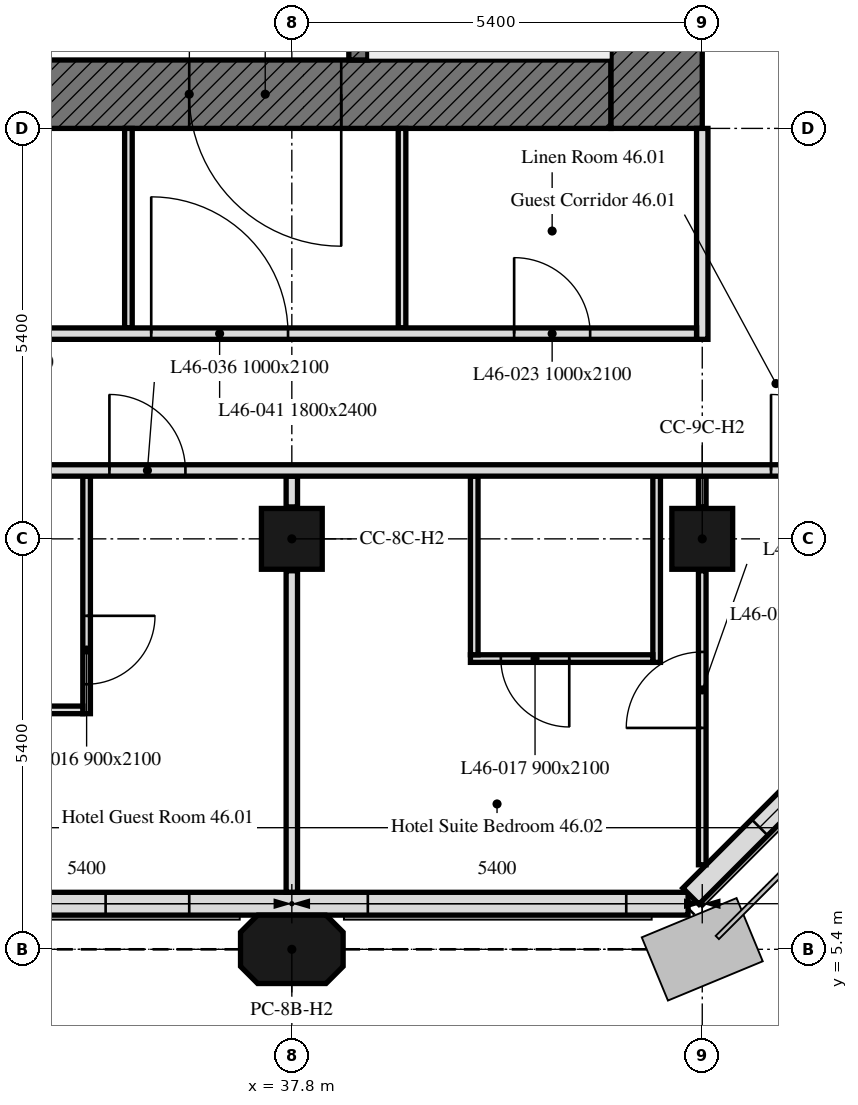
"""IFC4 building model, lengths in metres.
Left out: names, types, materials, properties, quantities, classifications, styles, units other than length and angle.
Written with IfcOpenShell. Run it as: python <this file> out.ifc"""

import sys

from ifc_helpers import new_model, si_unit, direction, frame, frame_2d, origin, origin_2d, place, context, subcontext, project, spatial, polyline, rectangle, outline, extrude, element, fill, save


model = new_model("IFC4")
c1 = context("Model", 3, precision=1e-05, world=origin(), true_north=direction((0.0, 1.0)))
c2 = subcontext(c1, "Body", "Model", "MODEL_VIEW")
j1 = project(units=[si_unit("LENGTHUNIT", "METRE"), si_unit("PLANEANGLEUNIT", "RADIAN")], contexts=[c1])
p1 = place(None, origin())
s1 = spatial("IfcSite", under=j1, at=p1, CompositionType="ELEMENT")
p2 = place(p1, origin())
s2 = spatial("IfcBuilding", under=s1, at=p2, CompositionType="ELEMENT")
p3 = place(p2, frame((0.0, 0.0, 190.6)))
s3 = spatial("IfcBuildingStorey", under=s2, at=p3, CompositionType="ELEMENT", Elevation=190.6)
p4 = place(p3, frame((37.8, 5.4, 0.0), z_axis=(0.0, 0.0, 1.0), x_axis=(1.0, 0.0, 0.0)))
e1 = element("IfcColumn", 1, at=p4, inside=s3, PredefinedType="COLUMN", context=c2, shape_type="SweptSolid", body=[
    extrude(outline(polyline([(-0.45, -0.45), (0.45, -0.45), (0.675, -0.225), (0.675, 0.225), (0.45, 0.45), (-0.45, 0.45), (-0.675, 0.225), (-0.675, -0.225), (-0.45, -0.45)])), origin(), (0.0, 0.0, 1.0), 3.0),
])
for number, where, z_axis, x_axis in (
    (2, (37.8, 10.8, 0.0), (0.0, 0.0, 1.0), (1.0, 0.0, 0.0)),
    (3, (43.2, 10.8, 0.0), (0.0, 0.0, 1.0), (1.0, 0.0, 0.0)),
):
    element("IfcColumn", number, at=place(p3, frame(where, z_axis=z_axis, x_axis=x_axis)), inside=s3, PredefinedType="COLUMN", context=c2, shape_type="SweptSolid", body=[
        extrude(rectangle(XDim=0.8, YDim=0.8, at=origin_2d()), origin(), (0.0, 0.0, 1.0), 3.0),
    ])
p5 = place(p3, frame((10.986, 6.0, 0.0), z_axis=(0.0, 0.0, 1.0), x_axis=(1.0, 0.0, 0.0)))
e4 = element("IfcWall", 4, at=p5, inside=s3, PredefinedType="SOLIDWALL", context=c2, shape_type="SweptSolid", body=[
    extrude(rectangle(XDim=32.027, YDim=0.3, at=frame_2d((16.014, 0.0))), origin(), (0.0, 0.0, 1.0), 3.0),
])
p6 = place(p5, frame((2.764, 0.0, 0.9)))
e5 = element("IfcOpeningElement", 5, at=p6, cuts=e4, PredefinedType="OPENING", context=c2, shape_type="SweptSolid", body=[
    extrude(rectangle(XDim=1.1, YDim=1.7, at=frame_2d((0.55, 0.85))), frame((0.0, 0.16, 0.0), z_axis=(0.0, -1.0, 0.0), x_axis=(1.0, 0.0, 0.0)), (0.0, 0.0, 1.0), 0.32),
])
p7 = place(p5, frame((6.214, 0.0, 0.9)))
e6 = element("IfcOpeningElement", 6, at=p7, cuts=e4, PredefinedType="OPENING", context=c2, shape_type="SweptSolid", body=[
    extrude(rectangle(XDim=3.4, YDim=1.7, at=frame_2d((1.7, 0.85))), frame((0.0, 0.16, 0.0), z_axis=(0.0, -1.0, 0.0), x_axis=(1.0, 0.0, 0.0)), (0.0, 0.0, 1.0), 0.32),
])
p8 = place(p5, frame((13.564, 0.0, 0.9)))
e7 = element("IfcOpeningElement", 7, at=p8, cuts=e4, PredefinedType="OPENING", context=c2, shape_type="SweptSolid", body=[
    extrude(rectangle(XDim=1.1, YDim=1.7, at=frame_2d((0.55, 0.85))), frame((0.0, 0.16, 0.0), z_axis=(0.0, -1.0, 0.0), x_axis=(1.0, 0.0, 0.0)), (0.0, 0.0, 1.0), 0.32),
])
p9 = place(p5, frame((17.014, 0.0, 0.9)))
e8 = element("IfcOpeningElement", 8, at=p9, cuts=e4, PredefinedType="OPENING", context=c2, shape_type="SweptSolid", body=[
    extrude(rectangle(XDim=3.4, YDim=1.7, at=frame_2d((1.7, 0.85))), frame((0.0, 0.16, 0.0), z_axis=(0.0, -1.0, 0.0), x_axis=(1.0, 0.0, 0.0)), (0.0, 0.0, 1.0), 0.32),
])
p10 = place(p5, frame((24.364, 0.0, 0.9)))
e9 = element("IfcOpeningElement", 9, at=p10, cuts=e4, PredefinedType="OPENING", context=c2, shape_type="SweptSolid", body=[
    extrude(rectangle(XDim=1.1, YDim=1.7, at=frame_2d((0.55, 0.85))), frame((0.0, 0.16, 0.0), z_axis=(0.0, -1.0, 0.0), x_axis=(1.0, 0.0, 0.0)), (0.0, 0.0, 1.0), 0.32),
])
p11 = place(p5, frame((27.814, 0.0, 0.9)))
e10 = element("IfcOpeningElement", 10, at=p11, cuts=e4, PredefinedType="OPENING", context=c2, shape_type="SweptSolid", body=[
    extrude(rectangle(XDim=3.4, YDim=1.7, at=frame_2d((1.7, 0.85))), frame((0.0, 0.16, 0.0), z_axis=(0.0, -1.0, 0.0), x_axis=(1.0, 0.0, 0.0)), (0.0, 0.0, 1.0), 0.32),
])
p12 = place(p3, frame((43.051, 6.099, 0.0), z_axis=(0.0, 0.0, 1.0), x_axis=(0.707106781187, 0.707106781187, 0.0)))
e11 = element("IfcWall", 11, at=p12, inside=s3, PredefinedType="SOLIDWALL", context=c2, shape_type="SweptSolid", body=[
    extrude(rectangle(XDim=6.86, YDim=0.3, at=frame_2d((3.43, 0.0))), origin(), (0.0, 0.0, 1.0), 3.0),
])
p13 = place(p12, frame((1.28, 0.0, 0.9)))
e12 = element("IfcOpeningElement", 12, at=p13, cuts=e11, PredefinedType="OPENING", context=c2, shape_type="SweptSolid", body=[
    extrude(rectangle(XDim=1.1, YDim=1.7, at=frame_2d((0.55, 0.85))), frame((0.0, 0.16, 0.0), z_axis=(0.0, -1.0, 0.0), x_axis=(1.0, 0.0, 0.0)), (0.0, 0.0, 1.0), 0.32),
])
p14 = place(p12, frame((4.48, 0.0, 0.9)))
e13 = element("IfcOpeningElement", 13, at=p14, cuts=e11, PredefinedType="OPENING", context=c2, shape_type="SweptSolid", body=[
    extrude(rectangle(XDim=1.1, YDim=1.7, at=frame_2d((0.55, 0.85))), frame((0.0, 0.16, 0.0), z_axis=(0.0, -1.0, 0.0), x_axis=(1.0, 0.0, 0.0)), (0.0, 0.0, 1.0), 0.32),
])
p15 = place(p3, frame((42.0, 16.65, 0.0), z_axis=(0.0, 0.0, 1.0), x_axis=(-1.0, 0.0, 0.0)))
e14 = element("IfcWall", 14, at=p15, inside=s3, PredefinedType="SOLIDWALL", context=c2, shape_type="SweptSolid", body=[
    extrude(rectangle(XDim=11.1, YDim=0.9, at=frame_2d((5.55, 0.0))), origin(), (0.0, 0.0, 1.0), 3.0),
])
p16 = place(p15, frame((3.55, 0.0, 0.0)))
e15 = element("IfcOpeningElement", 15, at=p16, cuts=e14, PredefinedType="OPENING", context=c2, shape_type="SweptSolid", body=[
    extrude(rectangle(XDim=2.0, YDim=2.4, at=frame_2d((1.0, 1.2))), frame((0.0, 0.45, 0.0), z_axis=(0.0, -1.0, 0.0), x_axis=(1.0, 0.0, 0.0)), (0.0, 0.0, 1.0), 0.9),
])
p17 = place(p3, frame((42.6, 32.4, 0.0), z_axis=(0.0, 0.0, 1.0), x_axis=(0.0, -1.0, 0.0)))
e16 = element("IfcWall", 16, at=p17, inside=s3, PredefinedType="SOLIDWALL", context=c2, shape_type="SweptSolid", body=[
    extrude(rectangle(XDim=16.2, YDim=1.2, at=frame_2d((8.1, 0.0))), origin(), (0.0, 0.0, 1.0), 3.0),
])
p18 = place(p3, frame((38.675, 17.1, 0.0), z_axis=(0.0, 0.0, 1.0), x_axis=(0.0, 1.0, 0.0)))
e17 = element("IfcWall", 17, at=p18, inside=s3, PredefinedType="SOLIDWALL", context=c2, shape_type="SweptSolid", body=[
    extrude(rectangle(XDim=14.4, YDim=0.25, at=frame_2d((7.2, 0.0))), origin(), (0.0, 0.0, 1.0), 3.0),
])
p19 = place(p18, frame((4.6, 0.0, 0.0)))
e18 = element("IfcOpeningElement", 18, at=p19, cuts=e17, PredefinedType="OPENING", context=c2, shape_type="SweptSolid", body=[
    extrude(rectangle(XDim=1.0, YDim=2.1, at=frame_2d((0.5, 1.05))), frame((0.0, 0.125, 0.0), z_axis=(0.0, -1.0, 0.0), x_axis=(1.0, 0.0, 0.0)), (0.0, 0.0, 1.0), 0.25),
])
p20 = place(p18, frame((7.062, 0.0, 0.0)))
e19 = element("IfcOpeningElement", 19, at=p20, cuts=e17, PredefinedType="OPENING", context=c2, shape_type="SweptSolid", body=[
    extrude(rectangle(XDim=1.2, YDim=2.1, at=frame_2d((0.6, 1.05))), frame((0.0, 0.125, 0.0), z_axis=(0.0, -1.0, 0.0), x_axis=(1.0, 0.0, 0.0)), (0.0, 0.0, 1.0), 0.25),
])
p21 = place(p18, frame((9.979, 0.0, 0.0)))
e20 = element("IfcOpeningElement", 20, at=p21, cuts=e17, PredefinedType="OPENING", context=c2, shape_type="SweptSolid", body=[
    extrude(rectangle(XDim=0.9, YDim=2.1, at=frame_2d((0.45, 1.05))), frame((0.0, 0.125, 0.0), z_axis=(0.0, -1.0, 0.0), x_axis=(1.0, 0.0, 0.0)), (0.0, 0.0, 1.0), 0.25),
])
p22 = place(p18, frame((11.92, 0.0, 0.0)))
e21 = element("IfcOpeningElement", 21, at=p22, cuts=e17, PredefinedType="OPENING", context=c2, shape_type="SweptSolid", body=[
    extrude(rectangle(XDim=0.9, YDim=2.1, at=frame_2d((0.45, 1.05))), frame((0.0, 0.125, 0.0), z_axis=(0.0, -1.0, 0.0), x_axis=(1.0, 0.0, 0.0)), (0.0, 0.0, 1.0), 0.25),
])
p23 = place(p18, frame((13.354, 0.0, 0.0)))
e22 = element("IfcOpeningElement", 22, at=p23, cuts=e17, PredefinedType="OPENING", context=c2, shape_type="SweptSolid", body=[
    extrude(rectangle(XDim=0.9, YDim=2.1, at=frame_2d((0.45, 1.05))), frame((0.0, 0.125, 0.0), z_axis=(0.0, -1.0, 0.0), x_axis=(1.0, 0.0, 0.0)), (0.0, 0.0, 1.0), 0.25),
])
p24 = place(p3, frame((37.8, 6.151, 0.0), z_axis=(0.0, 0.0, 1.0), x_axis=(0.0, 1.0, 0.0)))
e23 = element("IfcWall", 23, at=p24, inside=s3, PredefinedType="PARTITIONING", context=c2, shape_type="SweptSolid", body=[
    extrude(rectangle(XDim=4.229, YDim=0.15, at=frame_2d((2.115, 0.0))), origin(), (0.0, 0.0, 1.0), 3.0),
])
p25 = place(p3, frame((37.8, 11.22, 0.0), z_axis=(0.0, 0.0, 1.0), x_axis=(0.0, 1.0, 0.0)))
e24 = element("IfcWall", 24, at=p25, inside=s3, PredefinedType="PARTITIONING", context=c2, shape_type="SweptSolid", body=[
    extrude(rectangle(XDim=0.405, YDim=0.15, at=frame_2d((0.203, 0.0))), origin(), (0.0, 0.0, 1.0), 3.0),
])
p26 = place(p3, frame((35.1, 11.625, 0.0), z_axis=(0.0, 0.0, 1.0), x_axis=(0.0, -1.0, 0.0)))
e25 = element("IfcWall", 25, at=p26, inside=s3, PredefinedType="PARTITIONING", context=c2, shape_type="SweptSolid", body=[
    extrude(rectangle(XDim=3.125, YDim=0.1, at=frame_2d((1.562, 0.0))), origin(), (0.0, 0.0, 1.0), 3.0),
])
p27 = place(p26, frame((1.837, 0.0, 0.0)))
e26 = element("IfcOpeningElement", 26, at=p27, cuts=e25, PredefinedType="OPENING", context=c2, shape_type="SweptSolid", body=[
    extrude(rectangle(XDim=0.9, YDim=2.1, at=frame_2d((0.45, 1.05))), frame((0.0, 0.05, 0.0), z_axis=(0.0, -1.0, 0.0), x_axis=(1.0, 0.0, 0.0)), (0.0, 0.0, 1.0), 0.1),
])
p28 = place(p3, frame((35.05, 8.55, 0.0), z_axis=(0.0, 0.0, 1.0), x_axis=(-1.0, 0.0, 0.0)))
e27 = element("IfcWall", 27, at=p28, inside=s3, PredefinedType="PARTITIONING", context=c2, shape_type="SweptSolid", body=[
    extrude(rectangle(XDim=2.1, YDim=0.1, at=frame_2d((1.05, 0.0))), origin(), (0.0, 0.0, 1.0), 3.0),
])
p29 = place(p3, frame((43.2, 6.512, 0.0), z_axis=(0.0, 0.0, 1.0), x_axis=(0.0, 1.0, 0.0)))
e28 = element("IfcWall", 28, at=p29, inside=s3, PredefinedType="PARTITIONING", context=c2, shape_type="SweptSolid", body=[
    extrude(rectangle(XDim=3.868, YDim=0.1, at=frame_2d((1.934, 0.0))), origin(), (0.0, 0.0, 1.0), 3.0),
])
p30 = place(p29, frame((1.8, 0.0, 0.0)))
e29 = element("IfcOpeningElement", 29, at=p30, cuts=e28, PredefinedType="OPENING", context=c2, shape_type="SweptSolid", body=[
    extrude(rectangle(XDim=1.0, YDim=2.1, at=frame_2d((0.5, 1.05))), frame((0.0, 0.05, 0.0), z_axis=(0.0, -1.0, 0.0), x_axis=(1.0, 0.0, 0.0)), (0.0, 0.0, 1.0), 0.1),
])
p31 = place(p3, frame((43.2, 11.22, 0.0), z_axis=(0.0, 0.0, 1.0), x_axis=(0.0, 1.0, 0.0)))
e30 = element("IfcWall", 30, at=p31, inside=s3, PredefinedType="PARTITIONING", context=c2, shape_type="SweptSolid", body=[
    extrude(rectangle(XDim=0.405, YDim=0.1, at=frame_2d((0.203, 0.0))), origin(), (0.0, 0.0, 1.0), 3.0),
])
p32 = place(p3, frame((42.6, 11.625, 0.0), z_axis=(0.0, 0.0, 1.0), x_axis=(0.0, -1.0, 0.0)))
e31 = element("IfcWall", 31, at=p32, inside=s3, PredefinedType="PARTITIONING", context=c2, shape_type="SweptSolid", body=[
    extrude(rectangle(XDim=2.45, YDim=0.1, at=frame_2d((1.225, 0.0))), origin(), (0.0, 0.0, 1.0), 3.0),
])
p33 = place(p3, frame((42.55, 9.225, 0.0), z_axis=(0.0, 0.0, 1.0), x_axis=(-1.0, 0.0, 0.0)))
e32 = element("IfcWall", 32, at=p33, inside=s3, PredefinedType="PARTITIONING", context=c2, shape_type="SweptSolid", body=[
    extrude(rectangle(XDim=2.4, YDim=0.1, at=frame_2d((1.2, 0.0))), origin(), (0.0, 0.0, 1.0), 3.0),
])
p34 = place(p33, frame((1.1, 0.0, 0.0)))
e33 = element("IfcOpeningElement", 33, at=p34, cuts=e32, PredefinedType="OPENING", context=c2, shape_type="SweptSolid", body=[
    extrude(rectangle(XDim=0.9, YDim=2.1, at=frame_2d((0.45, 1.05))), frame((0.0, 0.05, 0.0), z_axis=(0.0, -1.0, 0.0), x_axis=(1.0, 0.0, 0.0)), (0.0, 0.0, 1.0), 0.1),
])
p35 = place(p3, frame((40.2, 9.275, 0.0), z_axis=(0.0, 0.0, 1.0), x_axis=(0.0, 1.0, 0.0)))
e34 = element("IfcWall", 34, at=p35, inside=s3, PredefinedType="PARTITIONING", context=c2, shape_type="SweptSolid", body=[
    extrude(rectangle(XDim=2.35, YDim=0.1, at=frame_2d((1.175, 0.0))), origin(), (0.0, 0.0, 1.0), 3.0),
])
p36 = place(p3, frame((6.151, 11.7, 0.0), z_axis=(0.0, 0.0, 1.0), x_axis=(1.0, 0.0, 0.0)))
e35 = element("IfcWall", 35, at=p36, inside=s3, PredefinedType="PARTITIONING", context=c2, shape_type="SweptSolid", body=[
    extrude(rectangle(XDim=41.698, YDim=0.15, at=frame_2d((20.849, 0.0))), origin(), (0.0, 0.0, 1.0), 3.0),
])
p37 = place(p36, frame((17.649, 0.0, 0.0)))
e36 = element("IfcOpeningElement", 36, at=p37, cuts=e35, PredefinedType="OPENING", context=c2, shape_type="SweptSolid", body=[
    extrude(rectangle(XDim=1.0, YDim=2.1, at=frame_2d((0.5, 1.05))), frame((0.0, 0.075, 0.0), z_axis=(0.0, -1.0, 0.0), x_axis=(1.0, 0.0, 0.0)), (0.0, 0.0, 1.0), 0.15),
])
p38 = place(p36, frame((1.449, 0.0, 0.0)))
e37 = element("IfcOpeningElement", 37, at=p38, cuts=e35, PredefinedType="OPENING", context=c2, shape_type="SweptSolid", body=[
    extrude(rectangle(XDim=1.0, YDim=2.1, at=frame_2d((0.5, 1.05))), frame((0.0, 0.075, 0.0), z_axis=(0.0, -1.0, 0.0), x_axis=(1.0, 0.0, 0.0)), (0.0, 0.0, 1.0), 0.15),
])
p39 = place(p36, frame((29.249, 0.0, 0.0)))
e38 = element("IfcOpeningElement", 38, at=p39, cuts=e35, PredefinedType="OPENING", context=c2, shape_type="SweptSolid", body=[
    extrude(rectangle(XDim=1.0, YDim=2.1, at=frame_2d((0.5, 1.05))), frame((0.0, 0.075, 0.0), z_axis=(0.0, -1.0, 0.0), x_axis=(1.0, 0.0, 0.0)), (0.0, 0.0, 1.0), 0.15),
])
p40 = place(p36, frame((37.954, 0.0, 0.0)))
e39 = element("IfcOpeningElement", 39, at=p40, cuts=e35, PredefinedType="OPENING", context=c2, shape_type="SweptSolid", body=[
    extrude(rectangle(XDim=1.0, YDim=2.1, at=frame_2d((0.5, 1.05))), frame((0.0, 0.075, 0.0), z_axis=(0.0, -1.0, 0.0), x_axis=(1.0, 0.0, 0.0)), (0.0, 0.0, 1.0), 0.15),
])
for number, where, z_axis, x_axis in (
    (40, (35.65, 16.2, 0.0), (0.0, 0.0, 1.0), (0.0, -1.0, 0.0)),
    (41, (39.25, 13.575, 0.0), (0.0, 0.0, 1.0), (0.0, 1.0, 0.0)),
):
    element("IfcWall", number, at=place(p3, frame(where, z_axis=z_axis, x_axis=x_axis)), inside=s3, PredefinedType="PARTITIONING", context=c2, shape_type="SweptSolid", body=[
        extrude(rectangle(XDim=2.625, YDim=0.1, at=frame_2d((1.312, 0.0))), origin(), (0.0, 0.0, 1.0), 3.0),
    ])
p41 = place(p3, frame((43.2, 16.2, 0.0), z_axis=(0.0, 0.0, 1.0), x_axis=(0.0, -1.0, 0.0)))
e42 = element("IfcWall", 42, at=p41, inside=s3, PredefinedType="PARTITIONING", context=c2, shape_type="SweptSolid", body=[
    extrude(rectangle(XDim=2.775, YDim=0.15, at=frame_2d((1.387, 0.0))), origin(), (0.0, 0.0, 1.0), 3.0),
])
p42 = place(p3, frame((9.45, 13.5, 0.0), z_axis=(0.0, 0.0, 1.0), x_axis=(1.0, 0.0, 0.0)))
e43 = element("IfcWall", 43, at=p42, inside=s3, PredefinedType="PARTITIONING", context=c2, shape_type="SweptSolid", body=[
    extrude(rectangle(XDim=33.675, YDim=0.15, at=frame_2d((16.837, 0.0))), origin(), (0.0, 0.0, 1.0), 3.0),
])
p43 = place(p42, frame((8.95, 0.0, 0.0)))
e44 = element("IfcOpeningElement", 44, at=p43, cuts=e43, PredefinedType="OPENING", context=c2, shape_type="SweptSolid", body=[
    extrude(rectangle(XDim=1.0, YDim=2.1, at=frame_2d((0.5, 1.05))), frame((0.0, 0.075, 0.0), z_axis=(0.0, -1.0, 0.0), x_axis=(1.0, 0.0, 0.0)), (0.0, 0.0, 1.0), 0.15),
])
p44 = place(p42, frame((15.517, 0.0, 0.0)))
e45 = element("IfcOpeningElement", 45, at=p44, cuts=e43, PredefinedType="OPENING", context=c2, shape_type="SweptSolid", body=[
    extrude(rectangle(XDim=1.0, YDim=2.1, at=frame_2d((0.5, 1.05))), frame((0.0, 0.075, 0.0), z_axis=(0.0, -1.0, 0.0), x_axis=(1.0, 0.0, 0.0)), (0.0, 0.0, 1.0), 0.15),
])
p45 = place(p42, frame((24.075, 0.0, 0.0)))
e46 = element("IfcOpeningElement", 46, at=p45, cuts=e43, PredefinedType="OPENING", context=c2, shape_type="SweptSolid", body=[
    extrude(rectangle(XDim=1.0, YDim=2.1, at=frame_2d((0.5, 1.05))), frame((0.0, 0.075, 0.0), z_axis=(0.0, -1.0, 0.0), x_axis=(1.0, 0.0, 0.0)), (0.0, 0.0, 1.0), 0.15),
])
p46 = place(p42, frame((31.275, 0.0, 0.0)))
e47 = element("IfcOpeningElement", 47, at=p46, cuts=e43, PredefinedType="OPENING", context=c2, shape_type="SweptSolid", body=[
    extrude(rectangle(XDim=1.0, YDim=2.1, at=frame_2d((0.5, 1.05))), frame((0.0, 0.075, 0.0), z_axis=(0.0, -1.0, 0.0), x_axis=(1.0, 0.0, 0.0)), (0.0, 0.0, 1.0), 0.15),
])
p47 = place(p42, frame((4.625, 0.0, 0.0)))
e48 = element("IfcOpeningElement", 48, at=p47, cuts=e43, PredefinedType="OPENING", context=c2, shape_type="SweptSolid", body=[
    extrude(rectangle(XDim=1.0, YDim=2.1, at=frame_2d((0.5, 1.05))), frame((0.0, 0.075, 0.0), z_axis=(0.0, -1.0, 0.0), x_axis=(1.0, 0.0, 0.0)), (0.0, 0.0, 1.0), 0.15),
])
p48 = place(p42, frame((1.4, 0.0, 0.0)))
e49 = element("IfcOpeningElement", 49, at=p48, cuts=e43, PredefinedType="OPENING", context=c2, shape_type="SweptSolid", body=[
    extrude(rectangle(XDim=1.8, YDim=2.4, at=frame_2d((0.9, 1.2))), frame((0.0, 0.075, 0.0), z_axis=(0.0, -1.0, 0.0), x_axis=(1.0, 0.0, 0.0)), (0.0, 0.0, 1.0), 0.15),
])
p49 = place(p42, frame((26.5, 0.0, 0.0)))
e50 = element("IfcOpeningElement", 50, at=p49, cuts=e43, PredefinedType="OPENING", context=c2, shape_type="SweptSolid", body=[
    extrude(rectangle(XDim=1.8, YDim=2.4, at=frame_2d((0.9, 1.2))), frame((0.0, 0.075, 0.0), z_axis=(0.0, -1.0, 0.0), x_axis=(1.0, 0.0, 0.0)), (0.0, 0.0, 1.0), 0.15),
])
p50 = place(p10, origin())
e51 = element("IfcWindow", 51, at=p50, inside=s3, PartitioningType="SINGLE_PANEL", PredefinedType="WINDOW", context=c2, shape_type="SweptSolid", body=[
    extrude(rectangle(XDim=1.1, YDim=1.7, at=frame_2d((0.55, 0.85))), frame((0.0, 0.03, 0.0), z_axis=(0.0, -1.0, 0.0), x_axis=(1.0, 0.0, 0.0)), (0.0, 0.0, 1.0), 0.06),
])
fill(e9, e51)
p51 = place(p11, origin())
e52 = element("IfcWindow", 52, at=p51, inside=s3, PartitioningType="SINGLE_PANEL", PredefinedType="WINDOW", context=c2, shape_type="SweptSolid", body=[
    extrude(rectangle(XDim=3.4, YDim=1.7, at=frame_2d((1.7, 0.85))), frame((0.0, 0.03, 0.0), z_axis=(0.0, -1.0, 0.0), x_axis=(1.0, 0.0, 0.0)), (0.0, 0.0, 1.0), 0.06),
])
fill(e10, e52)
p52 = place(p13, origin())
e53 = element("IfcWindow", 53, at=p52, inside=s3, PartitioningType="SINGLE_PANEL", PredefinedType="WINDOW", context=c2, shape_type="SweptSolid", body=[
    extrude(rectangle(XDim=1.1, YDim=1.7, at=frame_2d((0.55, 0.85))), frame((0.0, 0.03, 0.0), z_axis=(0.0, -1.0, 0.0), x_axis=(1.0, 0.0, 0.0)), (0.0, 0.0, 1.0), 0.06),
])
fill(e12, e53)
p53 = place(p16, origin())
e54 = element("IfcDoor", 54, at=p53, inside=s3, OperationType="DOUBLE_DOOR_SINGLE_SWING", PredefinedType="DOOR", context=c2, shape_type="SweptSolid", body=[
    extrude(rectangle(XDim=2.0, YDim=2.4, at=frame_2d((1.0, 1.2))), frame((0.0, 0.025, 0.0), z_axis=(0.0, -1.0, 0.0), x_axis=(1.0, 0.0, 0.0)), (0.0, 0.0, 1.0), 0.05),
])
fill(e15, e54)
p54 = place(p27, origin())
e55 = element("IfcDoor", 55, at=p54, inside=s3, OperationType="SINGLE_SWING_RIGHT", PredefinedType="DOOR", context=c2, shape_type="SweptSolid", body=[
    extrude(rectangle(XDim=0.9, YDim=2.1, at=frame_2d((0.45, 1.05))), frame((0.0, 0.025, 0.0), z_axis=(0.0, -1.0, 0.0), x_axis=(1.0, 0.0, 0.0)), (0.0, 0.0, 1.0), 0.05),
])
fill(e26, e55)
p55 = place(p34, origin())
e56 = element("IfcDoor", 56, at=p55, inside=s3, OperationType="SINGLE_SWING_RIGHT", PredefinedType="DOOR", context=c2, shape_type="SweptSolid", body=[
    extrude(rectangle(XDim=0.9, YDim=2.1, at=frame_2d((0.45, 1.05))), frame((0.0, 0.025, 0.0), z_axis=(0.0, -1.0, 0.0), x_axis=(1.0, 0.0, 0.0)), (0.0, 0.0, 1.0), 0.05),
])
fill(e33, e56)
p56 = place(p46, origin())
e57 = element("IfcDoor", 57, at=p56, inside=s3, OperationType="SINGLE_SWING_LEFT", PredefinedType="DOOR", context=c2, shape_type="SweptSolid", body=[
    extrude(rectangle(XDim=1.0, YDim=2.1, at=frame_2d((0.5, 1.05))), frame((0.0, 0.025, 0.0), z_axis=(0.0, -1.0, 0.0), x_axis=(1.0, 0.0, 0.0)), (0.0, 0.0, 1.0), 0.05),
])
fill(e47, e57)
p57 = place(p39, origin())
e58 = element("IfcDoor", 58, at=p57, inside=s3, OperationType="SINGLE_SWING_RIGHT", PredefinedType="DOOR", context=c2, shape_type="SweptSolid", body=[
    extrude(rectangle(XDim=1.0, YDim=2.1, at=frame_2d((0.5, 1.05))), frame((0.0, 0.025, 0.0), z_axis=(0.0, -1.0, 0.0), x_axis=(1.0, 0.0, 0.0)), (0.0, 0.0, 1.0), 0.05),
])
fill(e38, e58)
p58 = place(p30, origin())
e59 = element("IfcDoor", 59, at=p58, inside=s3, OperationType="SINGLE_SWING_RIGHT", PredefinedType="DOOR", context=c2, shape_type="SweptSolid", body=[
    extrude(rectangle(XDim=1.0, YDim=2.1, at=frame_2d((0.5, 1.05))), frame((0.0, 0.025, 0.0), z_axis=(0.0, -1.0, 0.0), x_axis=(1.0, 0.0, 0.0)), (0.0, 0.0, 1.0), 0.05),
])
fill(e29, e59)
p59 = place(p40, origin())
e60 = element("IfcDoor", 60, at=p59, inside=s3, OperationType="SINGLE_SWING_RIGHT", PredefinedType="DOOR", context=c2, shape_type="SweptSolid", body=[
    extrude(rectangle(XDim=1.0, YDim=2.1, at=frame_2d((0.5, 1.05))), frame((0.0, 0.025, 0.0), z_axis=(0.0, -1.0, 0.0), x_axis=(1.0, 0.0, 0.0)), (0.0, 0.0, 1.0), 0.05),
])
fill(e39, e60)
p60 = place(p49, origin())
e61 = element("IfcDoor", 61, at=p60, inside=s3, OperationType="DOUBLE_DOOR_SINGLE_SWING", PredefinedType="DOOR", context=c2, shape_type="SweptSolid", body=[
    extrude(rectangle(XDim=1.8, YDim=2.4, at=frame_2d((0.9, 1.2))), frame((0.0, 0.025, 0.0), z_axis=(0.0, -1.0, 0.0), x_axis=(1.0, 0.0, 0.0)), (0.0, 0.0, 1.0), 0.05),
])
fill(e50, e61)
save(model, sys.argv[1])
